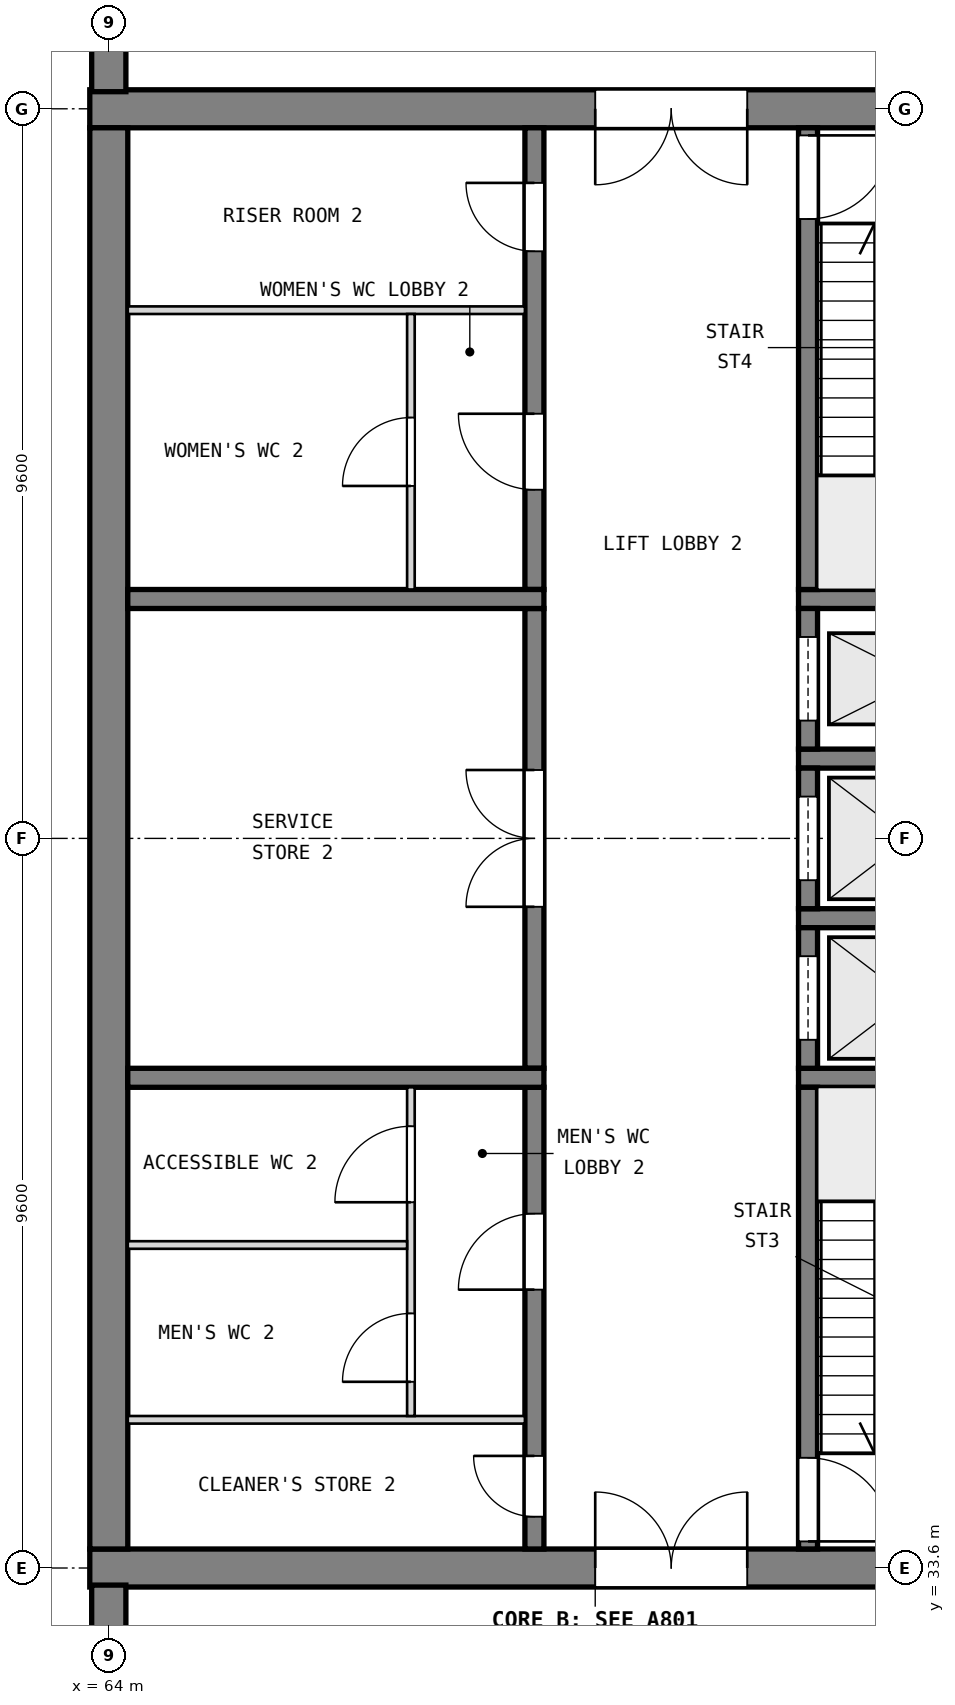
"""IFC4 building model, lengths in metres.
Left out: names, types, materials, properties, quantities, classifications, styles, units other than length and angle.
Written with IfcOpenShell. Run it as: python <this file> out.ifc"""

import sys

from ifc_helpers import new_model, si_unit, direction, frame, frame_2d, origin, place, context, subcontext, project, spatial, rectangle, extrude, element, fill, save


model = new_model("IFC4")
c1 = context("Model", 3, precision=1e-05, world=origin(), true_north=direction((0.0, 1.0)))
c2 = subcontext(c1, "Body", "Model", "MODEL_VIEW")
j1 = project(units=[si_unit("LENGTHUNIT", "METRE"), si_unit("PLANEANGLEUNIT", "RADIAN")], contexts=[c1])
p1 = place(None, origin())
s1 = spatial("IfcSite", under=j1, at=p1, CompositionType="ELEMENT")
p2 = place(p1, origin())
s2 = spatial("IfcBuilding", under=s1, at=p2, CompositionType="ELEMENT")
p3 = place(p2, frame((0.0, 0.0, -4.8)))
s3 = spatial("IfcBuildingStorey", under=s2, at=p3, CompositionType="ELEMENT", Elevation=-4.8)
p4 = place(p3, frame((63.75, 52.8, 0.0), z_axis=(0.0, 0.0, 1.0), x_axis=(1.0, 0.0, 0.0)))
e1 = element("IfcWall", 1, at=p4, inside=s3, PredefinedType="SHEAR", context=c2, shape_type="SweptSolid", body=[
    extrude(rectangle(XDim=13.3, YDim=0.5, at=frame_2d((6.65, 0.0))), origin(), (0.0, 0.0, 1.0), 4.8),
])
p5 = place(p4, frame((6.65, 0.0, 0.0)))
e2 = element("IfcOpeningElement", 2, at=p5, cuts=e1, PredefinedType="OPENING", context=c2, shape_type="SweptSolid", body=[
    extrude(rectangle(XDim=2.0, YDim=2.1, at=frame_2d((1.0, 1.05))), frame((0.0, 0.26, 0.0), z_axis=(0.0, -1.0, 0.0), x_axis=(1.0, 0.0, 0.0)), (0.0, 0.0, 1.0), 0.52),
])
p6 = place(p3, frame((63.75, 33.6, 0.0), z_axis=(0.0, 0.0, 1.0), x_axis=(1.0, 0.0, 0.0)))
e3 = element("IfcWall", 3, at=p6, inside=s3, PredefinedType="SHEAR", context=c2, shape_type="SweptSolid", body=[
    extrude(rectangle(XDim=13.3, YDim=0.5, at=frame_2d((6.65, 0.0))), origin(), (0.0, 0.0, 1.0), 4.8),
])
p7 = place(p6, frame((6.65, 0.0, 0.0)))
e4 = element("IfcOpeningElement", 4, at=p7, cuts=e3, PredefinedType="OPENING", context=c2, shape_type="SweptSolid", body=[
    extrude(rectangle(XDim=2.0, YDim=2.1, at=frame_2d((1.0, 1.05))), frame((0.0, 0.26, 0.0), z_axis=(0.0, -1.0, 0.0), x_axis=(1.0, 0.0, 0.0)), (0.0, 0.0, 1.0), 0.52),
])
p8 = place(p3, frame((64.0, 33.85, 0.0), z_axis=(0.0, 0.0, 1.0), x_axis=(0.0, 1.0, 0.0)))
e5 = element("IfcWall", 5, at=p8, inside=s3, PredefinedType="SHEAR", context=c2, shape_type="SweptSolid", body=[
    extrude(rectangle(XDim=18.7, YDim=0.5, at=frame_2d((9.35, 0.0))), origin(), (0.0, 0.0, 1.0), 4.8),
])
p9 = place(p3, frame((64.0, -0.225, 0.0), z_axis=(0.0, 0.0, 1.0), x_axis=(0.0, 1.0, 0.0)))
e6 = element("IfcWall", 6, at=p9, inside=s3, PredefinedType="SOLIDWALL", context=c2, shape_type="SweptSolid", body=[
    extrude(rectangle(XDim=33.6, YDim=0.45, at=frame_2d((16.8, 0.0))), origin(), (0.0, 0.0, 1.0), 4.8),
])
p10 = place(p3, frame((64.0, 53.025, 0.0), z_axis=(0.0, 0.0, 1.0), x_axis=(0.0, 1.0, 0.0)))
e7 = element("IfcWall", 7, at=p10, inside=s3, PredefinedType="SOLIDWALL", context=c2, shape_type="SweptSolid", body=[
    extrude(rectangle(XDim=4.8, YDim=0.45, at=frame_2d((2.4, 0.0))), origin(), (0.0, 0.0, 1.0), 4.8),
])
for number, where, z_axis, x_axis in (
    (8, (76.55, 40.05, 0.0), (0.0, 0.0, 1.0), (-1.0, 0.0, 0.0)),
    (9, (76.55, 42.15, 0.0), (0.0, 0.0, 1.0), (-1.0, 0.0, 0.0)),
    (10, (76.55, 44.25, 0.0), (0.0, 0.0, 1.0), (-1.0, 0.0, 0.0)),
    (11, (76.55, 46.35, 0.0), (0.0, 0.0, 1.0), (-1.0, 0.0, 0.0)),
):
    element("IfcWall", number, at=place(p3, frame(where, z_axis=z_axis, x_axis=x_axis)), inside=s3, PredefinedType="SOLIDWALL", context=c2, shape_type="SweptSolid", body=[
        extrude(rectangle(XDim=3.475, YDim=0.25, at=frame_2d((1.738, 0.0))), origin(), (0.0, 0.0, 1.0), 4.5),
    ])
p11 = place(p3, frame((73.2, 33.85, 0.0), z_axis=(0.0, 0.0, 1.0), x_axis=(0.0, 1.0, 0.0)))
e12 = element("IfcWall", 12, at=p11, inside=s3, PredefinedType="SOLIDWALL", context=c2, shape_type="SweptSolid", body=[
    extrude(rectangle(XDim=6.075, YDim=0.25, at=frame_2d((3.038, 0.0))), origin(), (0.0, 0.0, 1.0), 4.5),
])
p12 = place(p11, frame((0.1, 0.0, 0.0)))
e13 = element("IfcOpeningElement", 13, at=p12, cuts=e12, PredefinedType="OPENING", context=c2, shape_type="SweptSolid", body=[
    extrude(rectangle(XDim=1.1, YDim=2.1, at=frame_2d((0.55, 1.05))), frame((0.0, 0.135, 0.0), z_axis=(0.0, -1.0, 0.0), x_axis=(1.0, 0.0, 0.0)), (0.0, 0.0, 1.0), 0.27),
])
p13 = place(p3, frame((73.2, 40.175, 0.0), z_axis=(0.0, 0.0, 1.0), x_axis=(0.0, 1.0, 0.0)))
e14 = element("IfcWall", 14, at=p13, inside=s3, PredefinedType="SOLIDWALL", context=c2, shape_type="SweptSolid", body=[
    extrude(rectangle(XDim=1.85, YDim=0.25, at=frame_2d((0.925, 0.0))), origin(), (0.0, 0.0, 1.0), 4.5),
])
p14 = place(p13, frame((0.375, 0.0, 0.0)))
e15 = element("IfcOpeningElement", 15, at=p14, cuts=e14, PredefinedType="OPENING", context=c2, shape_type="SweptSolid", body=[
    extrude(rectangle(XDim=1.1, YDim=2.1, at=frame_2d((0.55, 1.05))), frame((0.0, 0.135, 0.0), z_axis=(0.0, -1.0, 0.0), x_axis=(1.0, 0.0, 0.0)), (0.0, 0.0, 1.0), 0.27),
])
p15 = place(p3, frame((73.2, 42.275, 0.0), z_axis=(0.0, 0.0, 1.0), x_axis=(0.0, 1.0, 0.0)))
e16 = element("IfcWall", 16, at=p15, inside=s3, PredefinedType="SOLIDWALL", context=c2, shape_type="SweptSolid", body=[
    extrude(rectangle(XDim=1.85, YDim=0.25, at=frame_2d((0.925, 0.0))), origin(), (0.0, 0.0, 1.0), 4.5),
])
p16 = place(p15, frame((0.375, 0.0, 0.0)))
e17 = element("IfcOpeningElement", 17, at=p16, cuts=e16, PredefinedType="OPENING", context=c2, shape_type="SweptSolid", body=[
    extrude(rectangle(XDim=1.1, YDim=2.1, at=frame_2d((0.55, 1.05))), frame((0.0, 0.135, 0.0), z_axis=(0.0, -1.0, 0.0), x_axis=(1.0, 0.0, 0.0)), (0.0, 0.0, 1.0), 0.27),
])
p17 = place(p3, frame((73.2, 44.375, 0.0), z_axis=(0.0, 0.0, 1.0), x_axis=(0.0, 1.0, 0.0)))
e18 = element("IfcWall", 18, at=p17, inside=s3, PredefinedType="SOLIDWALL", context=c2, shape_type="SweptSolid", body=[
    extrude(rectangle(XDim=1.85, YDim=0.25, at=frame_2d((0.925, 0.0))), origin(), (0.0, 0.0, 1.0), 4.5),
])
p18 = place(p17, frame((0.375, 0.0, 0.0)))
e19 = element("IfcOpeningElement", 19, at=p18, cuts=e18, PredefinedType="OPENING", context=c2, shape_type="SweptSolid", body=[
    extrude(rectangle(XDim=1.1, YDim=2.1, at=frame_2d((0.55, 1.05))), frame((0.0, 0.135, 0.0), z_axis=(0.0, -1.0, 0.0), x_axis=(1.0, 0.0, 0.0)), (0.0, 0.0, 1.0), 0.27),
])
p19 = place(p3, frame((73.2, 46.475, 0.0), z_axis=(0.0, 0.0, 1.0), x_axis=(0.0, 1.0, 0.0)))
e20 = element("IfcWall", 20, at=p19, inside=s3, PredefinedType="SOLIDWALL", context=c2, shape_type="SweptSolid", body=[
    extrude(rectangle(XDim=6.075, YDim=0.25, at=frame_2d((3.038, 0.0))), origin(), (0.0, 0.0, 1.0), 4.5),
])
p20 = place(p19, frame((4.875, 0.0, 0.0)))
e21 = element("IfcOpeningElement", 21, at=p20, cuts=e20, PredefinedType="OPENING", context=c2, shape_type="SweptSolid", body=[
    extrude(rectangle(XDim=1.1, YDim=2.1, at=frame_2d((0.55, 1.05))), frame((0.0, 0.135, 0.0), z_axis=(0.0, -1.0, 0.0), x_axis=(1.0, 0.0, 0.0)), (0.0, 0.0, 1.0), 0.27),
])
p21 = place(p3, frame((69.6, 33.85, 0.0), z_axis=(0.0, 0.0, 1.0), x_axis=(0.0, 1.0, 0.0)))
e22 = element("IfcWall", 22, at=p21, inside=s3, PredefinedType="SOLIDWALL", context=c2, shape_type="SweptSolid", body=[
    extrude(rectangle(XDim=6.075, YDim=0.25, at=frame_2d((3.038, 0.0))), origin(), (0.0, 0.0, 1.0), 4.5),
])
p22 = place(p21, frame((0.425, 0.0, 0.0)))
e23 = element("IfcOpeningElement", 23, at=p22, cuts=e22, PredefinedType="OPENING", context=c2, shape_type="SweptSolid", body=[
    extrude(rectangle(XDim=0.8, YDim=2.1, at=frame_2d((0.4, 1.05))), frame((0.0, 0.135, 0.0), z_axis=(0.0, -1.0, 0.0), x_axis=(1.0, 0.0, 0.0)), (0.0, 0.0, 1.0), 0.27),
])
p23 = place(p21, frame((3.413, 0.0, 0.0)))
e24 = element("IfcOpeningElement", 24, at=p23, cuts=e22, PredefinedType="OPENING", context=c2, shape_type="SweptSolid", body=[
    extrude(rectangle(XDim=1.0, YDim=2.1, at=frame_2d((0.5, 1.05))), frame((0.0, 0.135, 0.0), z_axis=(0.0, -1.0, 0.0), x_axis=(1.0, 0.0, 0.0)), (0.0, 0.0, 1.0), 0.27),
])
p24 = place(p3, frame((69.6, 40.175, 0.0), z_axis=(0.0, 0.0, 1.0), x_axis=(0.0, 1.0, 0.0)))
e25 = element("IfcWall", 25, at=p24, inside=s3, PredefinedType="SOLIDWALL", context=c2, shape_type="SweptSolid", body=[
    extrude(rectangle(XDim=6.05, YDim=0.25, at=frame_2d((3.025, 0.0))), origin(), (0.0, 0.0, 1.0), 4.5),
])
p25 = place(p24, frame((2.125, 0.0, 0.0)))
e26 = element("IfcOpeningElement", 26, at=p25, cuts=e25, PredefinedType="OPENING", context=c2, shape_type="SweptSolid", body=[
    extrude(rectangle(XDim=1.8, YDim=2.1, at=frame_2d((0.9, 1.05))), frame((0.0, 0.135, 0.0), z_axis=(0.0, -1.0, 0.0), x_axis=(1.0, 0.0, 0.0)), (0.0, 0.0, 1.0), 0.27),
])
p26 = place(p3, frame((69.6, 46.475, 0.0), z_axis=(0.0, 0.0, 1.0), x_axis=(0.0, 1.0, 0.0)))
e27 = element("IfcWall", 27, at=p26, inside=s3, PredefinedType="SOLIDWALL", context=c2, shape_type="SweptSolid", body=[
    extrude(rectangle(XDim=6.075, YDim=0.25, at=frame_2d((3.038, 0.0))), origin(), (0.0, 0.0, 1.0), 4.5),
])
p27 = place(p26, frame((1.312, 0.0, 0.0)))
e28 = element("IfcOpeningElement", 28, at=p27, cuts=e27, PredefinedType="OPENING", context=c2, shape_type="SweptSolid", body=[
    extrude(rectangle(XDim=1.0, YDim=2.1, at=frame_2d((0.5, 1.05))), frame((0.0, 0.135, 0.0), z_axis=(0.0, -1.0, 0.0), x_axis=(1.0, 0.0, 0.0)), (0.0, 0.0, 1.0), 0.27),
])
p28 = place(p26, frame((4.45, 0.0, 0.0)))
e29 = element("IfcOpeningElement", 29, at=p28, cuts=e27, PredefinedType="OPENING", context=c2, shape_type="SweptSolid", body=[
    extrude(rectangle(XDim=0.9, YDim=2.1, at=frame_2d((0.45, 1.05))), frame((0.0, 0.135, 0.0), z_axis=(0.0, -1.0, 0.0), x_axis=(1.0, 0.0, 0.0)), (0.0, 0.0, 1.0), 0.27),
])
for number, where, z_axis, x_axis in (
    (30, (69.725, 40.05, 0.0), (0.0, 0.0, 1.0), (-1.0, 0.0, 0.0)),
    (31, (69.725, 46.35, 0.0), (0.0, 0.0, 1.0), (-1.0, 0.0, 0.0)),
):
    element("IfcWall", number, at=place(p3, frame(where, z_axis=z_axis, x_axis=x_axis)), inside=s3, PredefinedType="SOLIDWALL", context=c2, shape_type="SweptSolid", body=[
        extrude(rectangle(XDim=5.475, YDim=0.25, at=frame_2d((2.738, 0.0))), origin(), (0.0, 0.0, 1.0), 4.5),
    ])
p29 = place(p3, frame((69.475, 35.55, 0.0), z_axis=(0.0, 0.0, 1.0), x_axis=(-1.0, 0.0, 0.0)))
e32 = element("IfcWall", 32, at=p29, inside=s3, PredefinedType="PARTITIONING", context=c2, shape_type="SweptSolid", body=[
    extrude(rectangle(XDim=5.225, YDim=0.1, at=frame_2d((2.613, 0.0))), origin(), (0.0, 0.0, 1.0), 4.5),
])
p30 = place(p3, frame((67.975, 35.6, 0.0), z_axis=(0.0, 0.0, 1.0), x_axis=(0.0, 1.0, 0.0)))
e33 = element("IfcWall", 33, at=p30, inside=s3, PredefinedType="PARTITIONING", context=c2, shape_type="SweptSolid", body=[
    extrude(rectangle(XDim=4.325, YDim=0.1, at=frame_2d((2.163, 0.0))), origin(), (0.0, 0.0, 1.0), 4.5),
])
p31 = place(p30, frame((0.45, 0.0, 0.0)))
e34 = element("IfcOpeningElement", 34, at=p31, cuts=e33, PredefinedType="OPENING", context=c2, shape_type="SweptSolid", body=[
    extrude(rectangle(XDim=0.9, YDim=2.1, at=frame_2d((0.45, 1.05))), frame((0.0, 0.06, 0.0), z_axis=(0.0, -1.0, 0.0), x_axis=(1.0, 0.0, 0.0)), (0.0, 0.0, 1.0), 0.12),
])
p32 = place(p30, frame((2.812, 0.0, 0.0)))
e35 = element("IfcOpeningElement", 35, at=p32, cuts=e33, PredefinedType="OPENING", context=c2, shape_type="SweptSolid", body=[
    extrude(rectangle(XDim=1.0, YDim=2.1, at=frame_2d((0.5, 1.05))), frame((0.0, 0.06, 0.0), z_axis=(0.0, -1.0, 0.0), x_axis=(1.0, 0.0, 0.0)), (0.0, 0.0, 1.0), 0.12),
])
p33 = place(p3, frame((67.925, 37.85, 0.0), z_axis=(0.0, 0.0, 1.0), x_axis=(-1.0, 0.0, 0.0)))
e36 = element("IfcWall", 36, at=p33, inside=s3, PredefinedType="PARTITIONING", context=c2, shape_type="SweptSolid", body=[
    extrude(rectangle(XDim=3.675, YDim=0.1, at=frame_2d((1.837, 0.0))), origin(), (0.0, 0.0, 1.0), 4.5),
])
p34 = place(p3, frame((69.475, 50.15, 0.0), z_axis=(0.0, 0.0, 1.0), x_axis=(-1.0, 0.0, 0.0)))
e37 = element("IfcWall", 37, at=p34, inside=s3, PredefinedType="PARTITIONING", context=c2, shape_type="SweptSolid", body=[
    extrude(rectangle(XDim=5.225, YDim=0.1, at=frame_2d((2.613, 0.0))), origin(), (0.0, 0.0, 1.0), 4.5),
])
p35 = place(p3, frame((67.975, 46.475, 0.0), z_axis=(0.0, 0.0, 1.0), x_axis=(0.0, 1.0, 0.0)))
e38 = element("IfcWall", 38, at=p35, inside=s3, PredefinedType="PARTITIONING", context=c2, shape_type="SweptSolid", body=[
    extrude(rectangle(XDim=3.625, YDim=0.1, at=frame_2d((1.812, 0.0))), origin(), (0.0, 0.0, 1.0), 4.5),
])
p36 = place(p35, frame((1.363, 0.0, 0.0)))
e39 = element("IfcOpeningElement", 39, at=p36, cuts=e38, PredefinedType="OPENING", context=c2, shape_type="SweptSolid", body=[
    extrude(rectangle(XDim=0.9, YDim=2.1, at=frame_2d((0.45, 1.05))), frame((0.0, 0.06, 0.0), z_axis=(0.0, -1.0, 0.0), x_axis=(1.0, 0.0, 0.0)), (0.0, 0.0, 1.0), 0.12),
])
p37 = place(p12, frame((1.1, 0.0, 0.0), z_axis=(0.0, 0.0, 1.0), x_axis=(-1.0, 0.0, 0.0)))
e40 = element("IfcDoor", 40, at=p37, inside=s3, OperationType="SINGLE_SWING_RIGHT", PredefinedType="DOOR", context=c2, shape_type="SweptSolid", body=[
    extrude(rectangle(XDim=1.1, YDim=2.1, at=frame_2d((0.55, 1.05))), frame((0.0, 0.025, 0.0), z_axis=(0.0, -1.0, 0.0), x_axis=(1.0, 0.0, 0.0)), (0.0, 0.0, 1.0), 0.05),
])
fill(e13, e40)
p38 = place(p20, frame((1.1, 0.0, 0.0), z_axis=(0.0, 0.0, 1.0), x_axis=(-1.0, 0.0, 0.0)))
e41 = element("IfcDoor", 41, at=p38, inside=s3, OperationType="SINGLE_SWING_LEFT", PredefinedType="DOOR", context=c2, shape_type="SweptSolid", body=[
    extrude(rectangle(XDim=1.1, YDim=2.1, at=frame_2d((0.55, 1.05))), frame((0.0, 0.025, 0.0), z_axis=(0.0, -1.0, 0.0), x_axis=(1.0, 0.0, 0.0)), (0.0, 0.0, 1.0), 0.05),
])
fill(e21, e41)
p39 = place(p14, origin())
e42 = element("IfcDoor", 42, at=p39, inside=s3, OperationType="SLIDING_TO_LEFT", PredefinedType="DOOR", context=c2, shape_type="SweptSolid", body=[
    extrude(rectangle(XDim=1.1, YDim=2.1, at=frame_2d((0.55, 1.05))), frame((0.0, 0.025, 0.0), z_axis=(0.0, -1.0, 0.0), x_axis=(1.0, 0.0, 0.0)), (0.0, 0.0, 1.0), 0.05),
])
fill(e15, e42)
p40 = place(p16, origin())
e43 = element("IfcDoor", 43, at=p40, inside=s3, OperationType="SLIDING_TO_LEFT", PredefinedType="DOOR", context=c2, shape_type="SweptSolid", body=[
    extrude(rectangle(XDim=1.1, YDim=2.1, at=frame_2d((0.55, 1.05))), frame((0.0, 0.025, 0.0), z_axis=(0.0, -1.0, 0.0), x_axis=(1.0, 0.0, 0.0)), (0.0, 0.0, 1.0), 0.05),
])
fill(e17, e43)
p41 = place(p18, origin())
e44 = element("IfcDoor", 44, at=p41, inside=s3, OperationType="SLIDING_TO_LEFT", PredefinedType="DOOR", context=c2, shape_type="SweptSolid", body=[
    extrude(rectangle(XDim=1.1, YDim=2.1, at=frame_2d((0.55, 1.05))), frame((0.0, 0.025, 0.0), z_axis=(0.0, -1.0, 0.0), x_axis=(1.0, 0.0, 0.0)), (0.0, 0.0, 1.0), 0.05),
])
fill(e19, e44)
p42 = place(p25, origin())
e45 = element("IfcDoor", 45, at=p42, inside=s3, OperationType="DOUBLE_DOOR_SINGLE_SWING", PredefinedType="DOOR", context=c2, shape_type="SweptSolid", body=[
    extrude(rectangle(XDim=1.8, YDim=2.1, at=frame_2d((0.9, 1.05))), frame((0.0, 0.025, 0.0), z_axis=(0.0, -1.0, 0.0), x_axis=(1.0, 0.0, 0.0)), (0.0, 0.0, 1.0), 0.05),
])
fill(e26, e45)
p43 = place(p22, origin())
e46 = element("IfcDoor", 46, at=p43, inside=s3, OperationType="SINGLE_SWING_RIGHT", PredefinedType="DOOR", context=c2, shape_type="SweptSolid", body=[
    extrude(rectangle(XDim=0.8, YDim=2.1, at=frame_2d((0.4, 1.05))), frame((0.0, 0.025, 0.0), z_axis=(0.0, -1.0, 0.0), x_axis=(1.0, 0.0, 0.0)), (0.0, 0.0, 1.0), 0.05),
])
fill(e23, e46)
p44 = place(p23, origin())
e47 = element("IfcDoor", 47, at=p44, inside=s3, OperationType="SINGLE_SWING_LEFT", PredefinedType="DOOR", context=c2, shape_type="SweptSolid", body=[
    extrude(rectangle(XDim=1.0, YDim=2.1, at=frame_2d((0.5, 1.05))), frame((0.0, 0.025, 0.0), z_axis=(0.0, -1.0, 0.0), x_axis=(1.0, 0.0, 0.0)), (0.0, 0.0, 1.0), 0.05),
])
fill(e24, e47)
p45 = place(p31, origin())
e48 = element("IfcDoor", 48, at=p45, inside=s3, OperationType="SINGLE_SWING_LEFT", PredefinedType="DOOR", context=c2, shape_type="SweptSolid", body=[
    extrude(rectangle(XDim=0.9, YDim=2.1, at=frame_2d((0.45, 1.05))), frame((0.0, 0.025, 0.0), z_axis=(0.0, -1.0, 0.0), x_axis=(1.0, 0.0, 0.0)), (0.0, 0.0, 1.0), 0.05),
])
fill(e34, e48)
p46 = place(p32, origin())
e49 = element("IfcDoor", 49, at=p46, inside=s3, OperationType="SINGLE_SWING_LEFT", PredefinedType="DOOR", context=c2, shape_type="SweptSolid", body=[
    extrude(rectangle(XDim=1.0, YDim=2.1, at=frame_2d((0.5, 1.05))), frame((0.0, 0.025, 0.0), z_axis=(0.0, -1.0, 0.0), x_axis=(1.0, 0.0, 0.0)), (0.0, 0.0, 1.0), 0.05),
])
fill(e35, e49)
p47 = place(p27, origin())
e50 = element("IfcDoor", 50, at=p47, inside=s3, OperationType="SINGLE_SWING_RIGHT", PredefinedType="DOOR", context=c2, shape_type="SweptSolid", body=[
    extrude(rectangle(XDim=1.0, YDim=2.1, at=frame_2d((0.5, 1.05))), frame((0.0, 0.025, 0.0), z_axis=(0.0, -1.0, 0.0), x_axis=(1.0, 0.0, 0.0)), (0.0, 0.0, 1.0), 0.05),
])
fill(e28, e50)
p48 = place(p36, origin())
e51 = element("IfcDoor", 51, at=p48, inside=s3, OperationType="SINGLE_SWING_LEFT", PredefinedType="DOOR", context=c2, shape_type="SweptSolid", body=[
    extrude(rectangle(XDim=0.9, YDim=2.1, at=frame_2d((0.45, 1.05))), frame((0.0, 0.025, 0.0), z_axis=(0.0, -1.0, 0.0), x_axis=(1.0, 0.0, 0.0)), (0.0, 0.0, 1.0), 0.05),
])
fill(e39, e51)
p49 = place(p28, origin())
e52 = element("IfcDoor", 52, at=p49, inside=s3, OperationType="SINGLE_SWING_RIGHT", PredefinedType="DOOR", context=c2, shape_type="SweptSolid", body=[
    extrude(rectangle(XDim=0.9, YDim=2.1, at=frame_2d((0.45, 1.05))), frame((0.0, 0.025, 0.0), z_axis=(0.0, -1.0, 0.0), x_axis=(1.0, 0.0, 0.0)), (0.0, 0.0, 1.0), 0.05),
])
fill(e29, e52)
p50 = place(p7, origin())
e53 = element("IfcDoor", 53, at=p50, inside=s3, OperationType="DOUBLE_DOOR_SINGLE_SWING", PredefinedType="DOOR", context=c2, shape_type="SweptSolid", body=[
    extrude(rectangle(XDim=2.0, YDim=2.1, at=frame_2d((1.0, 1.05))), frame((0.0, 0.025, 0.0), z_axis=(0.0, -1.0, 0.0), x_axis=(1.0, 0.0, 0.0)), (0.0, 0.0, 1.0), 0.05),
])
fill(e4, e53)
p51 = place(p5, frame((2.0, 0.0, 0.0), z_axis=(0.0, 0.0, 1.0), x_axis=(-1.0, 0.0, 0.0)))
e54 = element("IfcDoor", 54, at=p51, inside=s3, OperationType="DOUBLE_DOOR_SINGLE_SWING", PredefinedType="DOOR", context=c2, shape_type="SweptSolid", body=[
    extrude(rectangle(XDim=2.0, YDim=2.1, at=frame_2d((1.0, 1.05))), frame((0.0, 0.025, 0.0), z_axis=(0.0, -1.0, 0.0), x_axis=(1.0, 0.0, 0.0)), (0.0, 0.0, 1.0), 0.05),
])
fill(e2, e54)
save(model, sys.argv[1])
